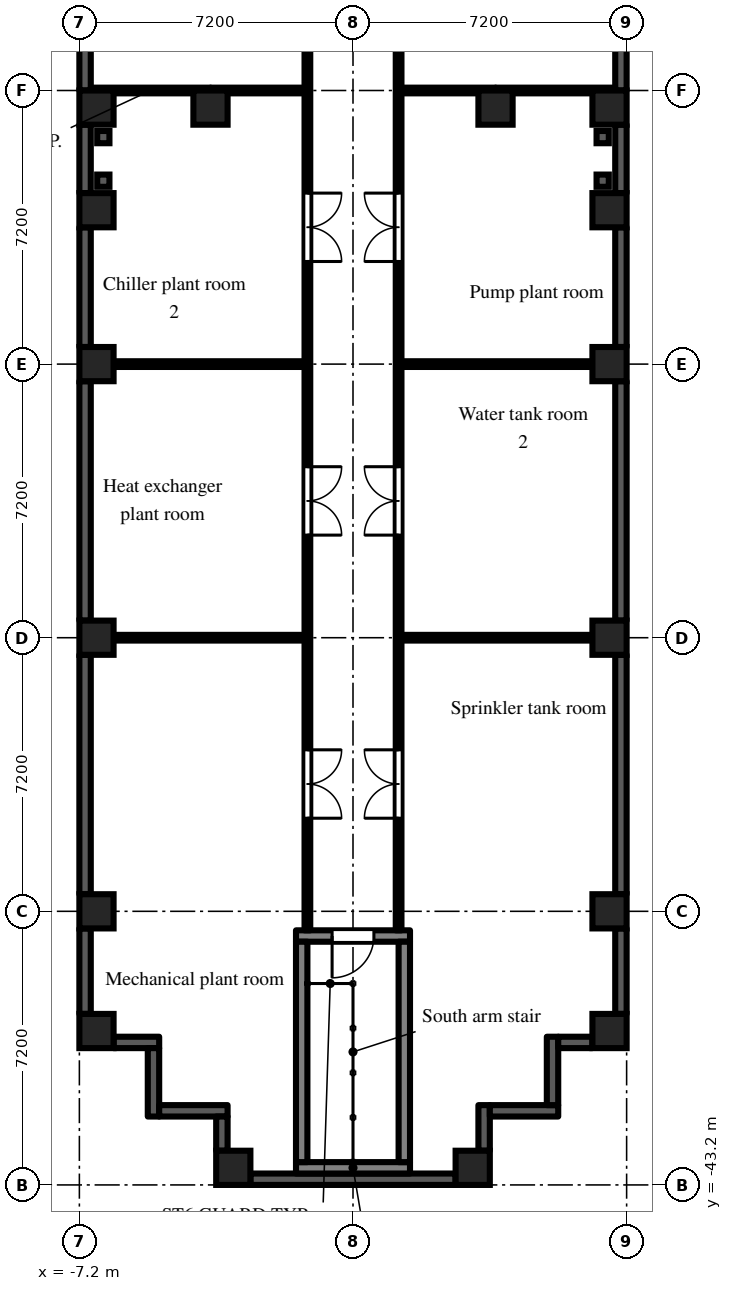
"""IFC4 building model, lengths in metres.
Left out: names, types, materials, properties, quantities, classifications, styles, units other than length and angle.
Written with IfcOpenShell. Run it as: python <this file> out.ifc"""

import sys

from ifc_helpers import new_model, si_unit, direction, frame, frame_2d, origin, origin_2d, place, context, subcontext, project, spatial, polyline, rectangle, outline, extrude, element, fill, save


model = new_model("IFC4")
c1 = context("Model", 3, precision=1e-05, world=origin(), true_north=direction((0.0, 1.0)))
c2 = subcontext(c1, "Body", "Model", "MODEL_VIEW")
j1 = project(units=[si_unit("LENGTHUNIT", "METRE"), si_unit("PLANEANGLEUNIT", "RADIAN")], contexts=[c1])
p1 = place(None, origin())
s1 = spatial("IfcSite", under=j1, at=p1, CompositionType="ELEMENT")
p2 = place(p1, origin())
s2 = spatial("IfcBuilding", under=s1, at=p2, CompositionType="ELEMENT")
p3 = place(p2, frame((0.0, 0.0, 111.9)))
s3 = spatial("IfcBuildingStorey", under=s2, at=p3, CompositionType="ELEMENT", Elevation=111.9)
for number, where, z_axis, x_axis in (
    (1, (-6.75, -39.15, 0.0), (0.0, 0.0, 1.0), (1.0, 0.0, 0.0)),
    (2, (-6.75, -36.0, 0.0), (0.0, 0.0, 1.0), (1.0, 0.0, 0.0)),
    (3, (-6.75, -28.8, 0.0), (0.0, 0.0, 1.0), (1.0, 0.0, 0.0)),
    (4, (-6.75, -21.6, 0.0), (0.0, 0.0, 1.0), (1.0, 0.0, 0.0)),
    (5, (-6.75, -17.55, 0.0), (0.0, 0.0, 1.0), (1.0, 0.0, 0.0)),
    (6, (-6.75, -14.85, 0.0), (0.0, 0.0, 1.0), (1.0, 0.0, 0.0)),
    (7, (-3.75, -14.85, 0.0), (0.0, 0.0, 1.0), (1.0, 0.0, 0.0)),
    (8, (-3.15, -42.75, 0.0), (0.0, 0.0, 1.0), (1.0, 0.0, 0.0)),
    (9, (3.15, -42.75, 0.0), (0.0, 0.0, 1.0), (1.0, 0.0, 0.0)),
    (10, (3.75, -14.85, 0.0), (0.0, 0.0, 1.0), (1.0, 0.0, 0.0)),
    (11, (6.75, -39.15, 0.0), (0.0, 0.0, 1.0), (1.0, 0.0, 0.0)),
    (12, (6.75, -36.0, 0.0), (0.0, 0.0, 1.0), (1.0, 0.0, 0.0)),
    (13, (6.75, -28.8, 0.0), (0.0, 0.0, 1.0), (1.0, 0.0, 0.0)),
    (14, (6.75, -21.6, 0.0), (0.0, 0.0, 1.0), (1.0, 0.0, 0.0)),
    (15, (6.75, -17.55, 0.0), (0.0, 0.0, 1.0), (1.0, 0.0, 0.0)),
    (16, (6.75, -14.85, 0.0), (0.0, 0.0, 1.0), (1.0, 0.0, 0.0)),
):
    element("IfcColumn", number, at=place(p3, frame(where, z_axis=z_axis, x_axis=x_axis)), inside=s3, PredefinedType="COLUMN", context=c2, shape_type="SweptSolid", body=[
        extrude(rectangle(XDim=0.9, YDim=0.9, at=origin_2d()), origin(), (0.0, 0.0, 1.0), 4.2),
    ])
p4 = place(p3, frame((-7.05, -7.2, 0.0), z_axis=(0.0, 0.0, 1.0), x_axis=(0.0, -1.0, 0.0)))
e17 = element("IfcWall", 17, at=p4, inside=s3, PredefinedType="SOLIDWALL", context=c2, shape_type="SweptSolid", body=[
    extrude(rectangle(XDim=7.2, YDim=0.3, at=frame_2d((3.6, 0.0))), origin(), (0.0, 0.0, 1.0), 3.8),
])
p5 = place(p3, frame((-7.05, -15.3, 0.0), z_axis=(0.0, 0.0, 1.0), x_axis=(0.0, -1.0, 0.0)))
e18 = element("IfcWall", 18, at=p5, inside=s3, PredefinedType="SOLIDWALL", context=c2, shape_type="SweptSolid", body=[
    extrude(rectangle(XDim=1.8, YDim=0.3, at=frame_2d((0.9, 0.0))), origin(), (0.0, 0.0, 1.0), 3.4),
])
p6 = place(p3, frame((-7.05, -18.0, 0.0), z_axis=(0.0, 0.0, 1.0), x_axis=(0.0, -1.0, 0.0)))
e19 = element("IfcWall", 19, at=p6, inside=s3, PredefinedType="SOLIDWALL", context=c2, shape_type="SweptSolid", body=[
    extrude(rectangle(XDim=3.15, YDim=0.3, at=frame_2d((1.575, 0.0))), origin(), (0.0, 0.0, 1.0), 3.8),
])
p7 = place(p3, frame((-7.05, -22.05, 0.0), z_axis=(0.0, 0.0, 1.0), x_axis=(0.0, -1.0, 0.0)))
e20 = element("IfcWall", 20, at=p7, inside=s3, PredefinedType="SOLIDWALL", context=c2, shape_type="SweptSolid", body=[
    extrude(outline(polyline([(0.0, 0.0), (6.3, 0.0), (6.3, 3.8), (1.952, 3.8), (1.95, 3.4), (1.15, 3.4), (1.148, 3.8), (0.0, 3.8), (0.0, 0.0)])), frame((0.0, 0.15, 0.0), z_axis=(0.0, -1.0, 0.0), x_axis=(1.0, 0.0, 0.0)), (0.0, 0.0, 1.0), 0.3),
])
p8 = place(p3, frame((-7.05, -29.25, 0.0), z_axis=(0.0, 0.0, 1.0), x_axis=(0.0, -1.0, 0.0)))
e21 = element("IfcWall", 21, at=p8, inside=s3, PredefinedType="SOLIDWALL", context=c2, shape_type="SweptSolid", body=[
    extrude(rectangle(XDim=6.3, YDim=0.3, at=frame_2d((3.15, 0.0))), origin(), (0.0, 0.0, 1.0), 3.8),
])
p9 = place(p3, frame((-7.05, -36.45, 0.0), z_axis=(0.0, 0.0, 1.0), x_axis=(0.0, -1.0, 0.0)))
e22 = element("IfcWall", 22, at=p9, inside=s3, PredefinedType="SOLIDWALL", context=c2, shape_type="SweptSolid", body=[
    extrude(rectangle(XDim=2.25, YDim=0.3, at=frame_2d((1.125, 0.0))), origin(), (0.0, 0.0, 1.0), 3.8),
])
p10 = place(p3, frame((-6.3, -39.45, 0.0), z_axis=(0.0, 0.0, 1.0), x_axis=(1.0, 0.0, 0.0)))
e23 = element("IfcWall", 23, at=p10, inside=s3, PredefinedType="SOLIDWALL", context=c2, shape_type="SweptSolid", body=[
    extrude(rectangle(XDim=1.2, YDim=0.3, at=frame_2d((0.6, 0.0))), origin(), (0.0, 0.0, 1.0), 3.8),
])
p11 = place(p3, frame((-5.25, -39.6, 0.0), z_axis=(0.0, 0.0, 1.0), x_axis=(0.0, -1.0, 0.0)))
e24 = element("IfcWall", 24, at=p11, inside=s3, PredefinedType="SOLIDWALL", context=c2, shape_type="SweptSolid", body=[
    extrude(rectangle(XDim=1.8, YDim=0.3, at=frame_2d((0.9, 0.0))), origin(), (0.0, 0.0, 1.0), 3.8),
])
p12 = place(p3, frame((-5.1, -41.25, 0.0), z_axis=(0.0, 0.0, 1.0), x_axis=(1.0, 0.0, 0.0)))
e25 = element("IfcWall", 25, at=p12, inside=s3, PredefinedType="SOLIDWALL", context=c2, shape_type="SweptSolid", body=[
    extrude(rectangle(XDim=1.8, YDim=0.3, at=frame_2d((0.9, 0.0))), origin(), (0.0, 0.0, 1.0), 3.8),
])
p13 = place(p3, frame((-3.45, -41.4, 0.0), z_axis=(0.0, 0.0, 1.0), x_axis=(0.0, -1.0, 0.0)))
e26 = element("IfcWall", 26, at=p13, inside=s3, PredefinedType="SOLIDWALL", context=c2, shape_type="SweptSolid", body=[
    extrude(rectangle(XDim=0.9, YDim=0.3, at=frame_2d((0.45, 0.0))), origin(), (0.0, 0.0, 1.0), 3.8),
])
p14 = place(p3, frame((-2.7, -43.05, 0.0), z_axis=(0.0, 0.0, 1.0), x_axis=(1.0, 0.0, 0.0)))
e27 = element("IfcWall", 27, at=p14, inside=s3, PredefinedType="SOLIDWALL", context=c2, shape_type="SweptSolid", body=[
    extrude(rectangle(XDim=5.4, YDim=0.3, at=frame_2d((2.7, 0.0))), origin(), (0.0, 0.0, 1.0), 3.8),
])
p15 = place(p3, frame((3.45, -42.3, 0.0), z_axis=(0.0, 0.0, 1.0), x_axis=(0.0, 1.0, 0.0)))
e28 = element("IfcWall", 28, at=p15, inside=s3, PredefinedType="SOLIDWALL", context=c2, shape_type="SweptSolid", body=[
    extrude(rectangle(XDim=1.2, YDim=0.3, at=frame_2d((0.6, 0.0))), origin(), (0.0, 0.0, 1.0), 3.8),
])
p16 = place(p3, frame((3.6, -41.25, 0.0), z_axis=(0.0, 0.0, 1.0), x_axis=(1.0, 0.0, 0.0)))
e29 = element("IfcWall", 29, at=p16, inside=s3, PredefinedType="SOLIDWALL", context=c2, shape_type="SweptSolid", body=[
    extrude(rectangle(XDim=1.8, YDim=0.3, at=frame_2d((0.9, 0.0))), origin(), (0.0, 0.0, 1.0), 3.8),
])
p17 = place(p3, frame((5.25, -41.1, 0.0), z_axis=(0.0, 0.0, 1.0), x_axis=(0.0, 1.0, 0.0)))
e30 = element("IfcWall", 30, at=p17, inside=s3, PredefinedType="SOLIDWALL", context=c2, shape_type="SweptSolid", body=[
    extrude(rectangle(XDim=1.8, YDim=0.3, at=frame_2d((0.9, 0.0))), origin(), (0.0, 0.0, 1.0), 3.8),
])
p18 = place(p3, frame((5.4, -39.45, 0.0), z_axis=(0.0, 0.0, 1.0), x_axis=(1.0, 0.0, 0.0)))
e31 = element("IfcWall", 31, at=p18, inside=s3, PredefinedType="SOLIDWALL", context=c2, shape_type="SweptSolid", body=[
    extrude(rectangle(XDim=0.9, YDim=0.3, at=frame_2d((0.45, 0.0))), origin(), (0.0, 0.0, 1.0), 3.8),
])
p19 = place(p3, frame((7.05, -38.7, 0.0), z_axis=(0.0, 0.0, 1.0), x_axis=(0.0, 1.0, 0.0)))
e32 = element("IfcWall", 32, at=p19, inside=s3, PredefinedType="SOLIDWALL", context=c2, shape_type="SweptSolid", body=[
    extrude(rectangle(XDim=2.25, YDim=0.3, at=frame_2d((1.125, 0.0))), origin(), (0.0, 0.0, 1.0), 3.8),
])
p20 = place(p3, frame((7.05, -35.55, 0.0), z_axis=(0.0, 0.0, 1.0), x_axis=(0.0, 1.0, 0.0)))
e33 = element("IfcWall", 33, at=p20, inside=s3, PredefinedType="SOLIDWALL", context=c2, shape_type="SweptSolid", body=[
    extrude(rectangle(XDim=6.3, YDim=0.3, at=frame_2d((3.15, 0.0))), origin(), (0.0, 0.0, 1.0), 3.8),
])
p21 = place(p3, frame((7.05, -28.35, 0.0), z_axis=(0.0, 0.0, 1.0), x_axis=(0.0, 1.0, 0.0)))
e34 = element("IfcWall", 34, at=p21, inside=s3, PredefinedType="SOLIDWALL", context=c2, shape_type="SweptSolid", body=[
    extrude(outline(polyline([(0.0, 0.0), (6.3, 0.0), (6.3, 3.8), (5.152, 3.8), (5.15, 3.4), (4.35, 3.4), (4.348, 3.8), (0.0, 3.8), (0.0, 0.0)])), frame((0.0, 0.15, 0.0), z_axis=(0.0, -1.0, 0.0), x_axis=(1.0, 0.0, 0.0)), (0.0, 0.0, 1.0), 0.3),
])
p22 = place(p3, frame((7.05, -21.15, 0.0), z_axis=(0.0, 0.0, 1.0), x_axis=(0.0, 1.0, 0.0)))
e35 = element("IfcWall", 35, at=p22, inside=s3, PredefinedType="SOLIDWALL", context=c2, shape_type="SweptSolid", body=[
    extrude(rectangle(XDim=3.15, YDim=0.3, at=frame_2d((1.575, 0.0))), origin(), (0.0, 0.0, 1.0), 3.8),
])
p23 = place(p3, frame((7.05, -17.1, 0.0), z_axis=(0.0, 0.0, 1.0), x_axis=(0.0, 1.0, 0.0)))
e36 = element("IfcWall", 36, at=p23, inside=s3, PredefinedType="SOLIDWALL", context=c2, shape_type="SweptSolid", body=[
    extrude(rectangle(XDim=1.8, YDim=0.3, at=frame_2d((0.9, 0.0))), origin(), (0.0, 0.0, 1.0), 3.4),
])
p24 = place(p3, frame((7.05, -14.4, 0.0), z_axis=(0.0, 0.0, 1.0), x_axis=(0.0, 1.0, 0.0)))
e37 = element("IfcWall", 37, at=p24, inside=s3, PredefinedType="SOLIDWALL", context=c2, shape_type="SweptSolid", body=[
    extrude(rectangle(XDim=7.5, YDim=0.3, at=frame_2d((3.75, 0.0))), origin(), (0.0, 0.0, 1.0), 3.8),
])
p25 = place(p3, frame((-1.5, -36.65, 0.0), z_axis=(0.0, 0.0, 1.0), x_axis=(1.0, 0.0, 0.0)))
e38 = element("IfcWall", 38, at=p25, inside=s3, PredefinedType="SHEAR", context=c2, shape_type="SweptSolid", body=[
    extrude(rectangle(XDim=3.0, YDim=0.3, at=frame_2d((1.5, 0.0))), origin(), (0.0, 0.0, 1.0), 3.8),
])
p26 = place(p25, frame((0.95, 0.0, 0.0)))
e39 = element("IfcOpeningElement", 39, at=p26, cuts=e38, PredefinedType="OPENING", context=c2, shape_type="SweptSolid", body=[
    extrude(rectangle(XDim=1.1, YDim=2.1, at=frame_2d((0.55, 1.05))), frame((0.0, 0.16, 0.0), z_axis=(0.0, -1.0, 0.0), x_axis=(1.0, 0.0, 0.0)), (0.0, 0.0, 1.0), 0.32),
])
p27 = place(p3, frame((-1.5, -42.75, 0.0), z_axis=(0.0, 0.0, 1.0), x_axis=(1.0, 0.0, 0.0)))
e40 = element("IfcWall", 40, at=p27, inside=s3, PredefinedType="SHEAR", context=c2, shape_type="SweptSolid", body=[
    extrude(rectangle(XDim=3.0, YDim=0.3, at=frame_2d((1.5, 0.0))), origin(), (0.0, 0.0, 1.0), 3.8),
])
for number, where, z_axis, x_axis in (
    (41, (-1.35, -36.8, 0.0), (0.0, 0.0, 1.0), (0.0, -1.0, 0.0)),
    (42, (1.35, -36.8, 0.0), (0.0, 0.0, 1.0), (0.0, -1.0, 0.0)),
):
    element("IfcWall", number, at=place(p3, frame(where, z_axis=z_axis, x_axis=x_axis)), inside=s3, PredefinedType="SHEAR", context=c2, shape_type="SweptSolid", body=[
        extrude(rectangle(XDim=5.8, YDim=0.3, at=frame_2d((2.9, 0.0))), origin(), (0.0, 0.0, 1.0), 3.8),
    ])
p28 = place(p3, frame((-6.9, -28.8, 0.0), z_axis=(0.0, 0.0, 1.0), x_axis=(1.0, 0.0, 0.0)))
e43 = element("IfcWall", 43, at=p28, inside=s3, PredefinedType="PARTITIONING", context=c2, shape_type="SweptSolid", body=[
    extrude(rectangle(XDim=5.625, YDim=0.15, at=frame_2d((2.812, 0.0))), origin(), (0.0, 0.0, 1.0), 3.8),
])
p29 = place(p3, frame((-6.9, -21.6, 0.0), z_axis=(0.0, 0.0, 1.0), x_axis=(1.0, 0.0, 0.0)))
e44 = element("IfcWall", 44, at=p29, inside=s3, PredefinedType="PARTITIONING", context=c2, shape_type="SweptSolid", body=[
    extrude(rectangle(XDim=5.625, YDim=0.15, at=frame_2d((2.812, 0.0))), origin(), (0.0, 0.0, 1.0), 2.2),
])
p30 = place(p3, frame((-6.9, -14.4, 0.0), z_axis=(0.0, 0.0, 1.0), x_axis=(1.0, 0.0, 0.0)))
e45 = element("IfcWall", 45, at=p30, inside=s3, PredefinedType="PARTITIONING", context=c2, shape_type="SweptSolid", body=[
    extrude(rectangle(XDim=3.15, YDim=0.15, at=frame_2d((1.575, 0.0))), origin(), (0.0, 0.0, 1.0), 3.4),
])
p31 = place(p3, frame((-1.2, -36.5, 0.0), z_axis=(0.0, 0.0, 1.0), x_axis=(0.0, 1.0, 0.0)))
e46 = element("IfcWall", 46, at=p31, inside=s3, PredefinedType="PARTITIONING", context=c2, shape_type="SweptSolid", body=[
    extrude(outline(polyline([(0.0, 0.0), (35.375, 0.0), (35.375, 3.8), (13.302, 3.8), (13.3, 3.4), (12.5, 3.4), (12.498, 3.8), (0.0, 3.8), (0.0, 0.0)])), frame((0.0, 0.075, 0.0), z_axis=(0.0, -1.0, 0.0), x_axis=(1.0, 0.0, 0.0)), (0.0, 0.0, 1.0), 0.15),
])
p32 = place(p31, frame((29.95, 0.0, 0.0)))
e47 = element("IfcOpeningElement", 47, at=p32, cuts=e46, PredefinedType="OPENING", context=c2, shape_type="SweptSolid", body=[
    extrude(rectangle(XDim=1.2, YDim=2.1, at=frame_2d((0.6, 1.05))), frame((0.0, 0.085, 0.0), z_axis=(0.0, -1.0, 0.0), x_axis=(1.0, 0.0, 0.0)), (0.0, 0.0, 1.0), 0.17),
])
p33 = place(p31, frame((34.3, 0.0, 0.0)))
e48 = element("IfcOpeningElement", 48, at=p33, cuts=e46, PredefinedType="OPENING", context=c2, shape_type="SweptSolid", body=[
    extrude(rectangle(XDim=0.9, YDim=2.1, at=frame_2d((0.45, 1.05))), frame((0.0, 0.085, 0.0), z_axis=(0.0, -1.0, 0.0), x_axis=(1.0, 0.0, 0.0)), (0.0, 0.0, 1.0), 0.17),
])
p34 = place(p31, frame((24.8, 0.0, 0.0)))
e49 = element("IfcOpeningElement", 49, at=p34, cuts=e46, PredefinedType="OPENING", context=c2, shape_type="SweptSolid", body=[
    extrude(rectangle(XDim=1.8, YDim=2.1, at=frame_2d((0.9, 1.05))), frame((0.0, 0.085, 0.0), z_axis=(0.0, -1.0, 0.0), x_axis=(1.0, 0.0, 0.0)), (0.0, 0.0, 1.0), 0.17),
])
p35 = place(p31, frame((17.6, 0.0, 0.0)))
e50 = element("IfcOpeningElement", 50, at=p35, cuts=e46, PredefinedType="OPENING", context=c2, shape_type="SweptSolid", body=[
    extrude(rectangle(XDim=1.8, YDim=2.1, at=frame_2d((0.9, 1.05))), frame((0.0, 0.085, 0.0), z_axis=(0.0, -1.0, 0.0), x_axis=(1.0, 0.0, 0.0)), (0.0, 0.0, 1.0), 0.17),
])
p36 = place(p31, frame((10.4, 0.0, 0.0)))
e51 = element("IfcOpeningElement", 51, at=p36, cuts=e46, PredefinedType="OPENING", context=c2, shape_type="SweptSolid", body=[
    extrude(rectangle(XDim=1.8, YDim=2.1, at=frame_2d((0.9, 1.05))), frame((0.0, 0.085, 0.0), z_axis=(0.0, -1.0, 0.0), x_axis=(1.0, 0.0, 0.0)), (0.0, 0.0, 1.0), 0.17),
])
p37 = place(p31, frame((2.95, 0.0, 0.0)))
e52 = element("IfcOpeningElement", 52, at=p37, cuts=e46, PredefinedType="OPENING", context=c2, shape_type="SweptSolid", body=[
    extrude(rectangle(XDim=1.8, YDim=2.1, at=frame_2d((0.9, 1.05))), frame((0.0, 0.085, 0.0), z_axis=(0.0, -1.0, 0.0), x_axis=(1.0, 0.0, 0.0)), (0.0, 0.0, 1.0), 0.17),
])
p38 = place(p3, frame((1.2, -36.5, 0.0), z_axis=(0.0, 0.0, 1.0), x_axis=(0.0, 1.0, 0.0)))
e53 = element("IfcWall", 53, at=p38, inside=s3, PredefinedType="PARTITIONING", context=c2, shape_type="SweptSolid", body=[
    extrude(outline(polyline([(0.0, 0.0), (35.375, 0.0), (35.375, 3.8), (13.302, 3.8), (13.3, 3.4), (12.5, 3.4), (12.498, 3.8), (0.0, 3.8), (0.0, 0.0)])), frame((0.0, 0.075, 0.0), z_axis=(0.0, -1.0, 0.0), x_axis=(1.0, 0.0, 0.0)), (0.0, 0.0, 1.0), 0.15),
])
p39 = place(p38, frame((30.15, 0.0, 0.0)))
e54 = element("IfcOpeningElement", 54, at=p39, cuts=e53, PredefinedType="OPENING", context=c2, shape_type="SweptSolid", body=[
    extrude(rectangle(XDim=1.2, YDim=2.1, at=frame_2d((0.6, 1.05))), frame((0.0, 0.085, 0.0), z_axis=(0.0, -1.0, 0.0), x_axis=(1.0, 0.0, 0.0)), (0.0, 0.0, 1.0), 0.17),
])
p40 = place(p38, frame((24.8, 0.0, 0.0)))
e55 = element("IfcOpeningElement", 55, at=p40, cuts=e53, PredefinedType="OPENING", context=c2, shape_type="SweptSolid", body=[
    extrude(rectangle(XDim=1.8, YDim=2.1, at=frame_2d((0.9, 1.05))), frame((0.0, 0.085, 0.0), z_axis=(0.0, -1.0, 0.0), x_axis=(1.0, 0.0, 0.0)), (0.0, 0.0, 1.0), 0.17),
])
p41 = place(p38, frame((17.6, 0.0, 0.0)))
e56 = element("IfcOpeningElement", 56, at=p41, cuts=e53, PredefinedType="OPENING", context=c2, shape_type="SweptSolid", body=[
    extrude(rectangle(XDim=1.8, YDim=2.1, at=frame_2d((0.9, 1.05))), frame((0.0, 0.085, 0.0), z_axis=(0.0, -1.0, 0.0), x_axis=(1.0, 0.0, 0.0)), (0.0, 0.0, 1.0), 0.17),
])
p42 = place(p38, frame((10.4, 0.0, 0.0)))
e57 = element("IfcOpeningElement", 57, at=p42, cuts=e53, PredefinedType="OPENING", context=c2, shape_type="SweptSolid", body=[
    extrude(rectangle(XDim=1.8, YDim=2.1, at=frame_2d((0.9, 1.05))), frame((0.0, 0.085, 0.0), z_axis=(0.0, -1.0, 0.0), x_axis=(1.0, 0.0, 0.0)), (0.0, 0.0, 1.0), 0.17),
])
p43 = place(p38, frame((2.95, 0.0, 0.0)))
e58 = element("IfcOpeningElement", 58, at=p43, cuts=e53, PredefinedType="OPENING", context=c2, shape_type="SweptSolid", body=[
    extrude(rectangle(XDim=1.8, YDim=2.1, at=frame_2d((0.9, 1.05))), frame((0.0, 0.085, 0.0), z_axis=(0.0, -1.0, 0.0), x_axis=(1.0, 0.0, 0.0)), (0.0, 0.0, 1.0), 0.17),
])
p44 = place(p3, frame((1.275, -28.8, 0.0), z_axis=(0.0, 0.0, 1.0), x_axis=(1.0, 0.0, 0.0)))
e59 = element("IfcWall", 59, at=p44, inside=s3, PredefinedType="PARTITIONING", context=c2, shape_type="SweptSolid", body=[
    extrude(rectangle(XDim=5.625, YDim=0.15, at=frame_2d((2.812, 0.0))), origin(), (0.0, 0.0, 1.0), 3.8),
])
p45 = place(p3, frame((1.275, -21.6, 0.0), z_axis=(0.0, 0.0, 1.0), x_axis=(1.0, 0.0, 0.0)))
e60 = element("IfcWall", 60, at=p45, inside=s3, PredefinedType="PARTITIONING", context=c2, shape_type="SweptSolid", body=[
    extrude(rectangle(XDim=5.625, YDim=0.15, at=frame_2d((2.812, 0.0))), origin(), (0.0, 0.0, 1.0), 2.2),
])
for number, where, z_axis, x_axis in (
    (61, (1.275, -14.4, 0.0), (0.0, 0.0, 1.0), (1.0, 0.0, 0.0)),
    (62, (-3.75, -14.4, 0.0), (0.0, 0.0, 1.0), (1.0, 0.0, 0.0)),
):
    element("IfcWall", number, at=place(p3, frame(where, z_axis=z_axis, x_axis=x_axis)), inside=s3, PredefinedType="PARTITIONING", context=c2, shape_type="SweptSolid", body=[
        extrude(rectangle(XDim=2.475, YDim=0.15, at=frame_2d((1.238, 0.0))), origin(), (0.0, 0.0, 1.0), 3.8),
    ])
p46 = place(p3, frame((3.75, -14.4, 0.0), z_axis=(0.0, 0.0, 1.0), x_axis=(1.0, 0.0, 0.0)))
e63 = element("IfcWall", 63, at=p46, inside=s3, PredefinedType="PARTITIONING", context=c2, shape_type="SweptSolid", body=[
    extrude(rectangle(XDim=3.15, YDim=0.15, at=frame_2d((1.575, 0.0))), origin(), (0.0, 0.0, 1.0), 3.4),
])
p47 = place(p26, frame((1.1, 0.0, 0.0), z_axis=(0.0, 0.0, 1.0), x_axis=(-1.0, 0.0, 0.0)))
e64 = element("IfcDoor", 64, at=p47, inside=s3, OperationType="SINGLE_SWING_RIGHT", PredefinedType="DOOR", context=c2, shape_type="SweptSolid", body=[
    extrude(rectangle(XDim=1.1, YDim=2.1, at=frame_2d((0.55, 1.05))), frame((0.0, 0.025, 0.0), z_axis=(0.0, -1.0, 0.0), x_axis=(1.0, 0.0, 0.0)), (0.0, 0.0, 1.0), 0.05),
])
fill(e39, e64)
p48 = place(p41, origin())
e65 = element("IfcDoor", 65, at=p48, inside=s3, OperationType="DOUBLE_DOOR_DOUBLE_SWING", PredefinedType="DOOR", context=c2, shape_type="SweptSolid", body=[
    extrude(rectangle(XDim=1.8, YDim=2.1, at=frame_2d((0.9, 1.05))), frame((0.0, 0.025, 0.0), z_axis=(0.0, -1.0, 0.0), x_axis=(1.0, 0.0, 0.0)), (0.0, 0.0, 1.0), 0.05),
])
fill(e56, e65)
p49 = place(p42, origin())
e66 = element("IfcDoor", 66, at=p49, inside=s3, OperationType="DOUBLE_DOOR_DOUBLE_SWING", PredefinedType="DOOR", context=c2, shape_type="SweptSolid", body=[
    extrude(rectangle(XDim=1.8, YDim=2.1, at=frame_2d((0.9, 1.05))), frame((0.0, 0.025, 0.0), z_axis=(0.0, -1.0, 0.0), x_axis=(1.0, 0.0, 0.0)), (0.0, 0.0, 1.0), 0.05),
])
fill(e57, e66)
p50 = place(p43, origin())
e67 = element("IfcDoor", 67, at=p50, inside=s3, OperationType="DOUBLE_DOOR_DOUBLE_SWING", PredefinedType="DOOR", context=c2, shape_type="SweptSolid", body=[
    extrude(rectangle(XDim=1.8, YDim=2.1, at=frame_2d((0.9, 1.05))), frame((0.0, 0.025, 0.0), z_axis=(0.0, -1.0, 0.0), x_axis=(1.0, 0.0, 0.0)), (0.0, 0.0, 1.0), 0.05),
])
fill(e58, e67)
p51 = place(p35, frame((1.8, 0.0, 0.0), z_axis=(0.0, 0.0, 1.0), x_axis=(-1.0, 0.0, 0.0)))
e68 = element("IfcDoor", 68, at=p51, inside=s3, OperationType="DOUBLE_DOOR_DOUBLE_SWING", PredefinedType="DOOR", context=c2, shape_type="SweptSolid", body=[
    extrude(rectangle(XDim=1.8, YDim=2.1, at=frame_2d((0.9, 1.05))), frame((0.0, 0.025, 0.0), z_axis=(0.0, -1.0, 0.0), x_axis=(1.0, 0.0, 0.0)), (0.0, 0.0, 1.0), 0.05),
])
fill(e50, e68)
p52 = place(p36, frame((1.8, 0.0, 0.0), z_axis=(0.0, 0.0, 1.0), x_axis=(-1.0, 0.0, 0.0)))
e69 = element("IfcDoor", 69, at=p52, inside=s3, OperationType="DOUBLE_DOOR_DOUBLE_SWING", PredefinedType="DOOR", context=c2, shape_type="SweptSolid", body=[
    extrude(rectangle(XDim=1.8, YDim=2.1, at=frame_2d((0.9, 1.05))), frame((0.0, 0.025, 0.0), z_axis=(0.0, -1.0, 0.0), x_axis=(1.0, 0.0, 0.0)), (0.0, 0.0, 1.0), 0.05),
])
fill(e51, e69)
p53 = place(p37, frame((1.8, 0.0, 0.0), z_axis=(0.0, 0.0, 1.0), x_axis=(-1.0, 0.0, 0.0)))
e70 = element("IfcDoor", 70, at=p53, inside=s3, OperationType="DOUBLE_DOOR_DOUBLE_SWING", PredefinedType="DOOR", context=c2, shape_type="SweptSolid", body=[
    extrude(rectangle(XDim=1.8, YDim=2.1, at=frame_2d((0.9, 1.05))), frame((0.0, 0.025, 0.0), z_axis=(0.0, -1.0, 0.0), x_axis=(1.0, 0.0, 0.0)), (0.0, 0.0, 1.0), 0.05),
])
fill(e52, e70)
save(model, sys.argv[1])
